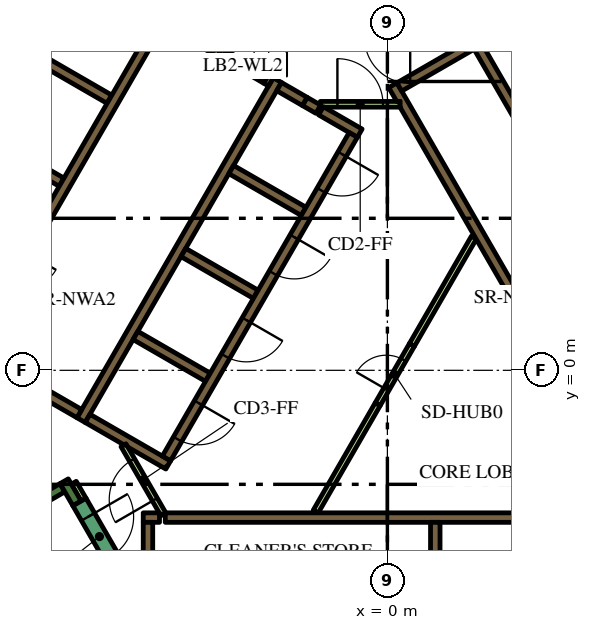
"""IFC4 building model, lengths in metres.
Left out: names, types, materials, properties, quantities, classifications, styles, units other than length and angle.
Written with IfcOpenShell. Run it as: python <this file> out.ifc"""

import sys

from ifc_helpers import new_model, si_unit, direction, frame, frame_2d, origin, place, context, subcontext, project, spatial, polyline, rectangle, outline, extrude, element, fill, save


model = new_model("IFC4")
c1 = context("Model", 3, precision=1e-05, world=origin(), true_north=direction((0.0, 1.0)))
c2 = subcontext(c1, "Body", "Model", "MODEL_VIEW")
j1 = project(units=[si_unit("LENGTHUNIT", "METRE"), si_unit("PLANEANGLEUNIT", "RADIAN")], contexts=[c1])
p1 = place(None, origin())
s1 = spatial("IfcSite", under=j1, at=p1, CompositionType="ELEMENT")
p2 = place(p1, origin())
s2 = spatial("IfcBuilding", under=s1, at=p2, CompositionType="ELEMENT")
p3 = place(p2, frame((0.0, 0.0, 78.3)))
s3 = spatial("IfcBuildingStorey", under=s2, at=p3, CompositionType="ELEMENT", Elevation=78.3)
p4 = place(p3, frame((-15.36, -1.503, 0.0), z_axis=(0.0, 0.0, 1.0), x_axis=(0.50000389221, 0.866023156604, 0.0)))
e1 = element("IfcWall", 1, at=p4, inside=s3, PredefinedType="SOLIDWALL", context=c2, shape_type="SweptSolid", body=[
    extrude(rectangle(XDim=21.0, YDim=0.9, at=frame_2d((10.5, 0.0))), origin(), (0.0, 0.0, 1.0), 5.4),
])
p5 = place(p3, frame((-14.44, -6.49, 0.0), z_axis=(0.0, 0.0, 1.0), x_axis=(0.866022966069, 0.500004222222, 0.0)))
e2 = element("IfcWall", 2, at=p5, inside=s3, PredefinedType="SOLIDWALL", context=c2, shape_type="SweptSolid", body=[
    extrude(rectangle(XDim=6.8, YDim=0.25, at=frame_2d((3.4, 0.0))), origin(), (0.0, 0.0, 1.0), 5.4),
])
p6 = place(p3, frame((-8.168, -3.503, 0.0), z_axis=(0.0, 0.0, 1.0), x_axis=(-0.499952099219, 0.866053057547, 0.0)))
e3 = element("IfcWall", 3, at=p6, inside=s3, PredefinedType="SOLIDWALL", context=c2, shape_type="SweptSolid", body=[
    extrude(rectangle(XDim=0.675, YDim=0.25, at=frame_2d((0.337, 0.0))), origin(), (0.0, 0.0, 1.0), 5.4),
])
p7 = place(p3, frame((-5.845, -3.875, 0.0), z_axis=(0.0, 0.0, 1.0), x_axis=(1.0, 0.0, 0.0)))
e4 = element("IfcWall", 4, at=p7, inside=s3, PredefinedType="SOLIDWALL", context=c2, shape_type="SweptSolid", body=[
    extrude(rectangle(XDim=12.27, YDim=0.25, at=frame_2d((6.135, 0.0))), origin(), (0.0, 0.0, 1.0), 5.4),
])
p8 = place(p3, frame((-6.425, -3.875, 0.0), z_axis=(0.0, 0.0, 1.0), x_axis=(1.0, 0.0, 0.0)))
e5 = element("IfcWall", 5, at=p8, inside=s3, PredefinedType="SOLIDWALL", context=c2, shape_type="SweptSolid", body=[
    extrude(rectangle(XDim=0.428, YDim=0.25, at=frame_2d((0.214, 0.0))), origin(), (0.0, 0.0, 1.0), 5.4),
])
p9 = place(p3, frame((1.26, -4.0, 0.0), z_axis=(0.0, 0.0, 1.0), x_axis=(0.0, -1.0, 0.0)))
e6 = element("IfcWall", 6, at=p9, inside=s3, PredefinedType="SOLIDWALL", context=c2, shape_type="SweptSolid", body=[
    extrude(rectangle(XDim=2.2, YDim=0.25, at=frame_2d((1.1, 0.0))), origin(), (0.0, 0.0, 1.0), 5.4),
])
p10 = place(p3, frame((-6.3, -4.0, 0.0), z_axis=(0.0, 0.0, 1.0), x_axis=(0.0, -1.0, 0.0)))
e7 = element("IfcWall", 7, at=p10, inside=s3, PredefinedType="SOLIDWALL", context=c2, shape_type="SweptSolid", body=[
    extrude(rectangle(XDim=3.154, YDim=0.25, at=frame_2d((1.577, 0.0))), origin(), (0.0, 0.0, 1.0), 5.4),
])
p11 = place(p3, origin())
e8 = element("IfcWall", 8, at=p11, inside=s3, PredefinedType="SOLIDWALL", context=c2, shape_type="SweptSolid", body=[
    extrude(outline(polyline([(0.335, 6.925), (0.335, 7.075), (0.335, 7.075), (0.335, 7.075), (0.245, 7.075), (0.079, 7.363), (0.035, 7.439), (0.252, 7.564), (0.377, 7.348), (6.552, -3.348), (6.677, -3.564), (6.46, -3.689), (4.897, -0.981), (0.332, 6.925), (0.335, 6.925), (0.335, 6.925), (0.335, 6.925)])), origin(), (0.0, 0.0, 1.0), 5.4),
])
p12 = place(p3, frame((0.314, 7.456, 0.0), z_axis=(0.0, 0.0, 1.0), x_axis=(0.866013897511, 0.50001992892, 0.0)))
e9 = element("IfcWall", 9, at=p12, inside=s3, PredefinedType="SOLIDWALL", context=c2, shape_type="SweptSolid", body=[
    extrude(rectangle(XDim=3.268, YDim=0.25, at=frame_2d((1.634, 0.0))), origin(), (0.0, 0.0, 1.0), 5.4),
])
p13 = place(p3, frame((-8.06, -1.311, 0.0), z_axis=(0.0, 0.0, 1.0), x_axis=(0.50000273126, 0.866023826885, 0.0)))
e10 = element("IfcWall", 10, at=p13, inside=s3, PredefinedType="SOLIDWALL", context=c2, shape_type="SweptSolid", body=[
    extrude(rectangle(XDim=10.33, YDim=0.25, at=frame_2d((5.165, 0.0))), origin(), (0.0, 0.0, 1.0), 5.4),
])
p14 = place(p3, frame((-1.819, 6.87, 0.0), z_axis=(0.0, 0.0, 1.0), x_axis=(-0.866294599386, 0.499533449405, 0.0)))
e11 = element("IfcWall", 11, at=p14, inside=s3, PredefinedType="SOLIDWALL", context=c2, shape_type="SweptSolid", body=[
    extrude(rectangle(XDim=0.41, YDim=0.25, at=frame_2d((0.205, 0.0))), origin(), (0.0, 0.0, 1.0), 5.4),
])
p15 = place(p3, frame((-2.849, 7.465, 0.0), z_axis=(0.0, 0.0, 1.0), x_axis=(0.865955664968, -0.500120771724, 0.0)))
e12 = element("IfcWall", 12, at=p15, inside=s3, PredefinedType="SOLIDWALL", context=c2, shape_type="SweptSolid", body=[
    extrude(rectangle(XDim=0.778, YDim=0.25, at=frame_2d((0.389, 0.0))), origin(), (0.0, 0.0, 1.0), 5.4),
])
p16 = place(p3, frame((-0.728, 6.24, 0.0), z_axis=(0.0, 0.0, 1.0), x_axis=(-0.866002680491, 0.500039355833, 0.0)))
e13 = element("IfcWall", 13, at=p16, inside=s3, PredefinedType="SOLIDWALL", context=c2, shape_type="SweptSolid", body=[
    extrude(rectangle(XDim=1.178, YDim=0.25, at=frame_2d((0.589, 0.0))), origin(), (0.0, 0.0, 1.0), 5.4),
])
for number, where, z_axis, x_axis in (
    (14, (-2.204, 4.182, 0.0), (0.0, 0.0, 1.0), (-0.866, 0.5, 0.0)),
    (15, (-5.369, 3.1, 0.0), (0.0, 0.0, 1.0), (0.866, -0.5, 0.0)),
    (16, (-4.724, -0.182, 0.0), (0.0, 0.0, 1.0), (-0.866, 0.5, 0.0)),
):
    element("IfcWall", number, at=place(p3, frame(where, z_axis=z_axis, x_axis=x_axis)), inside=s3, PredefinedType="SOLIDWALL", context=c2, shape_type="SweptSolid", body=[
        extrude(rectangle(XDim=2.2, YDim=0.25, at=frame_2d((1.1, 0.0))), origin(), (0.0, 0.0, 1.0), 5.4),
    ])
e17 = element("IfcWall", 17, at=p11, inside=s3, PredefinedType="SOLIDWALL", context=c2, shape_type="SweptSolid", body=[
    extrude(outline(polyline([(-5.922, -2.257), (-5.922, -2.257), (-5.705, -2.382), (-5.83, -2.598), (-6.829, -2.021), (-6.88, -1.934), (-6.88, -1.934), (-6.93, -1.963), (-7.952, -1.373), (-7.827, -1.156), (-5.922, -2.257)])), origin(), (0.0, 0.0, 1.0), 5.4),
])
p17 = place(p3, frame((-8.106, -1.14, 0.0), z_axis=(0.0, 0.0, 1.0), x_axis=(-0.866000643155, 0.500042884217, 0.0)))
e18 = element("IfcWall", 18, at=p17, inside=s3, PredefinedType="SOLIDWALL", context=c2, shape_type="SweptSolid", body=[
    extrude(rectangle(XDim=5.65, YDim=0.25, at=frame_2d((2.825, 0.0))), origin(), (0.0, 0.0, 1.0), 5.4),
])
e19 = element("IfcWall", 19, at=p11, inside=s3, PredefinedType="SOLIDWALL", context=c2, shape_type="SweptSolid", body=[
    extrude(outline(polyline([(-3.128, 7.481), (-3.259, 7.557), (-3.134, 7.773), (-3.003, 7.698), (-3.128, 7.481)])), origin(), (0.0, 0.0, 1.0), 5.4),
])
for number, where, z_axis, x_axis in (
    (20, (-8.574, 4.95, 0.0), (0.0, 0.0, 1.0), (-0.866, 0.5, 0.0)),
    (21, (-7.314, 7.132, 0.0), (0.0, 0.0, 1.0), (-0.866, 0.5, 0.0)),
):
    element("IfcWall", number, at=place(p3, frame(where, z_axis=z_axis, x_axis=x_axis)), inside=s3, PredefinedType="SOLIDWALL", context=c2, shape_type="SweptSolid", body=[
        extrude(rectangle(XDim=2.2, YDim=0.25, at=frame_2d((1.1, 0.0))), origin(), (0.0, 0.0, 1.0), 5.4),
    ])
p18 = place(p3, frame((-7.959, 10.415, 0.0), z_axis=(0.0, 0.0, 1.0), x_axis=(0.866020958405, -0.500007699544, 0.0)))
e22 = element("IfcWall", 22, at=p18, inside=s3, PredefinedType="SOLIDWALL", context=c2, shape_type="SweptSolid", body=[
    extrude(rectangle(XDim=4.1, YDim=0.25, at=frame_2d((2.05, 0.0))), origin(), (0.0, 0.0, 1.0), 5.4),
])
p19 = place(p3, frame((-8.252, -2.958, 0.0), z_axis=(0.0, 0.0, 1.0), x_axis=(0.500174715838, -0.865924508047, 0.0)))
e23 = element("IfcWall", 23, at=p19, inside=s3, PredefinedType="PARTITIONING", context=c2, shape_type="SweptSolid", body=[
    extrude(rectangle(XDim=0.514, YDim=0.15, at=frame_2d((0.257, 0.0))), origin(), (0.0, 0.0, 1.0), 4.25),
])
for number, where, z_axis, x_axis in (
    (24, (-1.887, -3.718, 0.0), (0.0, 0.0, 1.0), (0.5, 0.866, 0.0)),
    (25, (0.645, 0.667, 0.0), (0.0, 0.0, 1.0), (0.5, 0.866, 0.0)),
):
    element("IfcWall", number, at=place(p3, frame(where, z_axis=z_axis, x_axis=x_axis)), inside=s3, PredefinedType="PARTITIONING", context=c2, shape_type="SweptSolid", body=[
        extrude(rectangle(XDim=3.263, YDim=0.15, at=frame_2d((1.632, 0.0))), origin(), (0.0, 0.0, 1.0), 4.25),
    ])
p20 = place(p3, frame((8.565, -2.185, 0.0), z_axis=(0.0, 0.0, 1.0), x_axis=(-0.499997954832, 0.866026584559, 0.0)))
e26 = element("IfcWall", 26, at=p20, inside=s3, PredefinedType="SOLIDWALL", context=c2, shape_type="SweptSolid", body=[
    extrude(rectangle(XDim=12.35, YDim=0.25, at=frame_2d((6.175, 0.0))), origin(), (0.0, 0.0, 1.0), 5.4),
])
p21 = place(p20, frame((5.725, 0.0, 0.0)))
e27 = element("IfcOpeningElement", 27, at=p21, cuts=e26, PredefinedType="OPENING", context=c2, shape_type="SweptSolid", body=[
    extrude(rectangle(XDim=0.9, YDim=2.1, at=frame_2d((0.45, 1.05))), frame((0.0, 0.135, 0.0), z_axis=(0.0, -1.0, 0.0), x_axis=(1.0, 0.0, 0.0)), (0.0, 0.0, 1.0), 0.27),
])
p22 = place(p3, frame((-6.008, 9.144, 0.0), z_axis=(0.0, 0.0, 1.0), x_axis=(-0.500006956611, -0.866021387346, 0.0)))
e28 = element("IfcWall", 28, at=p22, inside=s3, PredefinedType="SOLIDWALL", context=c2, shape_type="SweptSolid", body=[
    extrude(rectangle(XDim=9.83, YDim=0.25, at=frame_2d((4.915, 0.0))), origin(), (0.0, 0.0, 1.0), 5.4),
])
p23 = place(p22, frame((6.985, 0.0, 0.0)))
e29 = element("IfcOpeningElement", 29, at=p23, cuts=e28, PredefinedType="OPENING", context=c2, shape_type="SweptSolid", body=[
    extrude(rectangle(XDim=0.9, YDim=2.1, at=frame_2d((0.45, 1.05))), frame((0.0, 0.135, 0.0), z_axis=(0.0, -1.0, 0.0), x_axis=(1.0, 0.0, 0.0)), (0.0, 0.0, 1.0), 0.27),
])
p24 = place(p3, frame((-0.898, 6.194, 0.0), z_axis=(0.0, 0.0, 1.0), x_axis=(-0.499996202215, -0.866027596426, 0.0)))
e30 = element("IfcWall", 30, at=p24, inside=s3, PredefinedType="SOLIDWALL", context=c2, shape_type="SweptSolid", body=[
    extrude(rectangle(XDim=9.83, YDim=0.25, at=frame_2d((4.915, 0.0))), origin(), (0.0, 0.0, 1.0), 5.4),
])
p25 = place(p24, frame((0.585, 0.0, 0.0)))
e31 = element("IfcOpeningElement", 31, at=p25, cuts=e30, PredefinedType="OPENING", context=c2, shape_type="SweptSolid", body=[
    extrude(rectangle(XDim=1.1, YDim=2.1, at=frame_2d((0.55, 1.05))), frame((0.0, 0.135, 0.0), z_axis=(0.0, -1.0, 0.0), x_axis=(1.0, 0.0, 0.0)), (0.0, 0.0, 1.0), 0.27),
])
p26 = place(p24, frame((3.105, 0.0, 0.0)))
e32 = element("IfcOpeningElement", 32, at=p26, cuts=e30, PredefinedType="OPENING", context=c2, shape_type="SweptSolid", body=[
    extrude(rectangle(XDim=1.1, YDim=2.1, at=frame_2d((0.55, 1.05))), frame((0.0, 0.135, 0.0), z_axis=(0.0, -1.0, 0.0), x_axis=(1.0, 0.0, 0.0)), (0.0, 0.0, 1.0), 0.27),
])
p27 = place(p24, frame((5.625, 0.0, 0.0)))
e33 = element("IfcOpeningElement", 33, at=p27, cuts=e30, PredefinedType="OPENING", context=c2, shape_type="SweptSolid", body=[
    extrude(rectangle(XDim=1.1, YDim=2.1, at=frame_2d((0.55, 1.05))), frame((0.0, 0.135, 0.0), z_axis=(0.0, -1.0, 0.0), x_axis=(1.0, 0.0, 0.0)), (0.0, 0.0, 1.0), 0.27),
])
p28 = place(p24, frame((8.145, 0.0, 0.0)))
e34 = element("IfcOpeningElement", 34, at=p28, cuts=e30, PredefinedType="OPENING", context=c2, shape_type="SweptSolid", body=[
    extrude(rectangle(XDim=1.1, YDim=2.1, at=frame_2d((0.55, 1.05))), frame((0.0, 0.135, 0.0), z_axis=(0.0, -1.0, 0.0), x_axis=(1.0, 0.0, 0.0)), (0.0, 0.0, 1.0), 0.27),
])
p29 = place(p3, frame((-8.103, -3.466, 0.0), z_axis=(0.0, 0.0, 1.0), x_axis=(0.500078061341, -0.865980330357, 0.0)))
e35 = element("IfcWall", 35, at=p29, inside=s3, PredefinedType="SOLIDWALL", context=c2, shape_type="SweptSolid", body=[
    extrude(rectangle(XDim=2.1, YDim=0.4, at=frame_2d((1.05, 0.0))), origin(), (0.0, 0.0, 1.0), 5.4),
])
p30 = place(p29, frame((0.45, 0.0, 0.0)))
e36 = element("IfcOpeningElement", 36, at=p30, cuts=e35, PredefinedType="OPENING", context=c2, shape_type="SweptSolid", body=[
    extrude(rectangle(XDim=1.2, YDim=2.1, at=frame_2d((0.6, 1.05))), frame((0.0, 0.21, 0.0), z_axis=(0.0, -1.0, 0.0), x_axis=(1.0, 0.0, 0.0)), (0.0, 0.0, 1.0), 0.42),
])
p31 = place(p3, frame((-1.765, 7.0, 0.0), z_axis=(0.0, 0.0, 1.0), x_axis=(1.0, 0.0, 0.0)))
e37 = element("IfcWall", 37, at=p31, inside=s3, PredefinedType="PARTITIONING", context=c2, shape_type="SweptSolid", body=[
    extrude(rectangle(XDim=2.1, YDim=0.15, at=frame_2d((1.05, 0.0))), origin(), (0.0, 0.0, 1.0), 4.25),
])
p32 = place(p31, frame((0.45, 0.0, 0.0)))
e38 = element("IfcOpeningElement", 38, at=p32, cuts=e37, PredefinedType="OPENING", context=c2, shape_type="SweptSolid", body=[
    extrude(rectangle(XDim=1.2, YDim=2.1, at=frame_2d((0.6, 1.05))), frame((0.0, 0.085, 0.0), z_axis=(0.0, -1.0, 0.0), x_axis=(1.0, 0.0, 0.0)), (0.0, 0.0, 1.0), 0.17),
])
p33 = place(p3, frame((-5.895, -3.79, 0.0), z_axis=(0.0, 0.0, 1.0), x_axis=(-0.49994051562, 0.866059744384, 0.0)))
e39 = element("IfcWall", 39, at=p33, inside=s3, PredefinedType="PARTITIONING", context=c2, shape_type="SweptSolid", body=[
    extrude(rectangle(XDim=2.1, YDim=0.15, at=frame_2d((1.05, 0.0))), origin(), (0.0, 0.0, 1.0), 4.25),
])
p34 = place(p33, frame((0.45, 0.0, 0.0)))
e40 = element("IfcOpeningElement", 40, at=p34, cuts=e39, PredefinedType="OPENING", context=c2, shape_type="SweptSolid", body=[
    extrude(rectangle(XDim=1.2, YDim=2.1, at=frame_2d((0.6, 1.05))), frame((0.0, 0.085, 0.0), z_axis=(0.0, -1.0, 0.0), x_axis=(1.0, 0.0, 0.0)), (0.0, 0.0, 1.0), 0.17),
])
p35 = place(p3, frame((-4.409, 8.365, 0.0), z_axis=(0.0, 0.0, 1.0), x_axis=(0.866034573852, -0.49998411664, 0.0)))
e41 = element("IfcWall", 41, at=p35, inside=s3, PredefinedType="SOLIDWALL", context=c2, shape_type="SweptSolid", body=[
    extrude(rectangle(XDim=1.4, YDim=0.25, at=frame_2d((0.7, 0.0))), origin(), (0.0, 0.0, 1.0), 5.4),
])
p36 = place(p35, frame((0.1, 0.0, 0.0)))
e42 = element("IfcOpeningElement", 42, at=p36, cuts=e41, PredefinedType="OPENING", context=c2, shape_type="SweptSolid", body=[
    extrude(rectangle(XDim=1.2, YDim=2.1, at=frame_2d((0.6, 1.05))), frame((0.0, 0.135, 0.0), z_axis=(0.0, -1.0, 0.0), x_axis=(1.0, 0.0, 0.0)), (0.0, 0.0, 1.0), 0.27),
])
p37 = place(p3, frame((-0.255, -0.892, 0.0), z_axis=(0.0, 0.0, 1.0), x_axis=(0.500062916607, 0.865989075817, 0.0)))
e43 = element("IfcWall", 43, at=p37, inside=s3, PredefinedType="PARTITIONING", context=c2, shape_type="SweptSolid", body=[
    extrude(rectangle(XDim=1.8, YDim=0.15, at=frame_2d((0.9, 0.0))), origin(), (0.0, 0.0, 1.0), 4.25),
])
p38 = place(p37, frame((0.45, 0.0, 0.0)))
e44 = element("IfcOpeningElement", 44, at=p38, cuts=e43, PredefinedType="OPENING", context=c2, shape_type="SweptSolid", body=[
    extrude(rectangle(XDim=0.9, YDim=2.1, at=frame_2d((0.45, 1.05))), frame((0.0, 0.085, 0.0), z_axis=(0.0, -1.0, 0.0), x_axis=(1.0, 0.0, 0.0)), (0.0, 0.0, 1.0), 0.17),
])
p39 = place(p25, origin())
e45 = element("IfcDoor", 45, at=p39, inside=s3, OperationType="DOUBLE_DOOR_SLIDING", PredefinedType="DOOR", context=c2, shape_type="SweptSolid", body=[
    extrude(rectangle(XDim=1.1, YDim=2.1, at=frame_2d((0.55, 1.05))), frame((0.0, 0.025, 0.0), z_axis=(0.0, -1.0, 0.0), x_axis=(1.0, 0.0, 0.0)), (0.0, 0.0, 1.0), 0.05),
])
fill(e31, e45)
p40 = place(p26, origin())
e46 = element("IfcDoor", 46, at=p40, inside=s3, OperationType="DOUBLE_DOOR_SLIDING", PredefinedType="DOOR", context=c2, shape_type="SweptSolid", body=[
    extrude(rectangle(XDim=1.1, YDim=2.1, at=frame_2d((0.55, 1.05))), frame((0.0, 0.025, 0.0), z_axis=(0.0, -1.0, 0.0), x_axis=(1.0, 0.0, 0.0)), (0.0, 0.0, 1.0), 0.05),
])
fill(e32, e46)
p41 = place(p27, origin())
e47 = element("IfcDoor", 47, at=p41, inside=s3, OperationType="DOUBLE_DOOR_SLIDING", PredefinedType="DOOR", context=c2, shape_type="SweptSolid", body=[
    extrude(rectangle(XDim=1.1, YDim=2.1, at=frame_2d((0.55, 1.05))), frame((0.0, 0.025, 0.0), z_axis=(0.0, -1.0, 0.0), x_axis=(1.0, 0.0, 0.0)), (0.0, 0.0, 1.0), 0.05),
])
fill(e33, e47)
p42 = place(p28, origin())
e48 = element("IfcDoor", 48, at=p42, inside=s3, OperationType="DOUBLE_DOOR_SLIDING", PredefinedType="DOOR", context=c2, shape_type="SweptSolid", body=[
    extrude(rectangle(XDim=1.1, YDim=2.1, at=frame_2d((0.55, 1.05))), frame((0.0, 0.025, 0.0), z_axis=(0.0, -1.0, 0.0), x_axis=(1.0, 0.0, 0.0)), (0.0, 0.0, 1.0), 0.05),
])
fill(e34, e48)
p43 = place(p30, origin())
e49 = element("IfcDoor", 49, at=p43, inside=s3, OperationType="SINGLE_SWING_LEFT", PredefinedType="DOOR", context=c2, shape_type="SweptSolid", body=[
    extrude(rectangle(XDim=1.2, YDim=2.1, at=frame_2d((0.6, 1.05))), frame((0.0, 0.025, 0.0), z_axis=(0.0, -1.0, 0.0), x_axis=(1.0, 0.0, 0.0)), (0.0, 0.0, 1.0), 0.05),
])
fill(e36, e49)
p44 = place(p32, origin())
e50 = element("IfcDoor", 50, at=p44, inside=s3, OperationType="SINGLE_SWING_LEFT", PredefinedType="DOOR", context=c2, shape_type="SweptSolid", body=[
    extrude(rectangle(XDim=1.2, YDim=2.1, at=frame_2d((0.6, 1.05))), frame((0.0, 0.025, 0.0), z_axis=(0.0, -1.0, 0.0), x_axis=(1.0, 0.0, 0.0)), (0.0, 0.0, 1.0), 0.05),
])
fill(e38, e50)
p45 = place(p34, origin())
e51 = element("IfcDoor", 51, at=p45, inside=s3, OperationType="SINGLE_SWING_LEFT", PredefinedType="DOOR", context=c2, shape_type="SweptSolid", body=[
    extrude(rectangle(XDim=1.2, YDim=2.1, at=frame_2d((0.6, 1.05))), frame((0.0, 0.025, 0.0), z_axis=(0.0, -1.0, 0.0), x_axis=(1.0, 0.0, 0.0)), (0.0, 0.0, 1.0), 0.05),
])
fill(e40, e51)
p46 = place(p36, origin())
e52 = element("IfcDoor", 52, at=p46, inside=s3, OperationType="SINGLE_SWING_LEFT", PredefinedType="DOOR", context=c2, shape_type="SweptSolid", body=[
    extrude(rectangle(XDim=1.2, YDim=2.1, at=frame_2d((0.6, 1.05))), frame((0.0, 0.025, 0.0), z_axis=(0.0, -1.0, 0.0), x_axis=(1.0, 0.0, 0.0)), (0.0, 0.0, 1.0), 0.05),
])
fill(e42, e52)
p47 = place(p38, origin())
e53 = element("IfcDoor", 53, at=p47, inside=s3, OperationType="SINGLE_SWING_LEFT", PredefinedType="DOOR", context=c2, shape_type="SweptSolid", body=[
    extrude(rectangle(XDim=0.9, YDim=2.1, at=frame_2d((0.45, 1.05))), frame((0.0, 0.025, 0.0), z_axis=(0.0, -1.0, 0.0), x_axis=(1.0, 0.0, 0.0)), (0.0, 0.0, 1.0), 0.05),
])
fill(e44, e53)
save(model, sys.argv[1])
